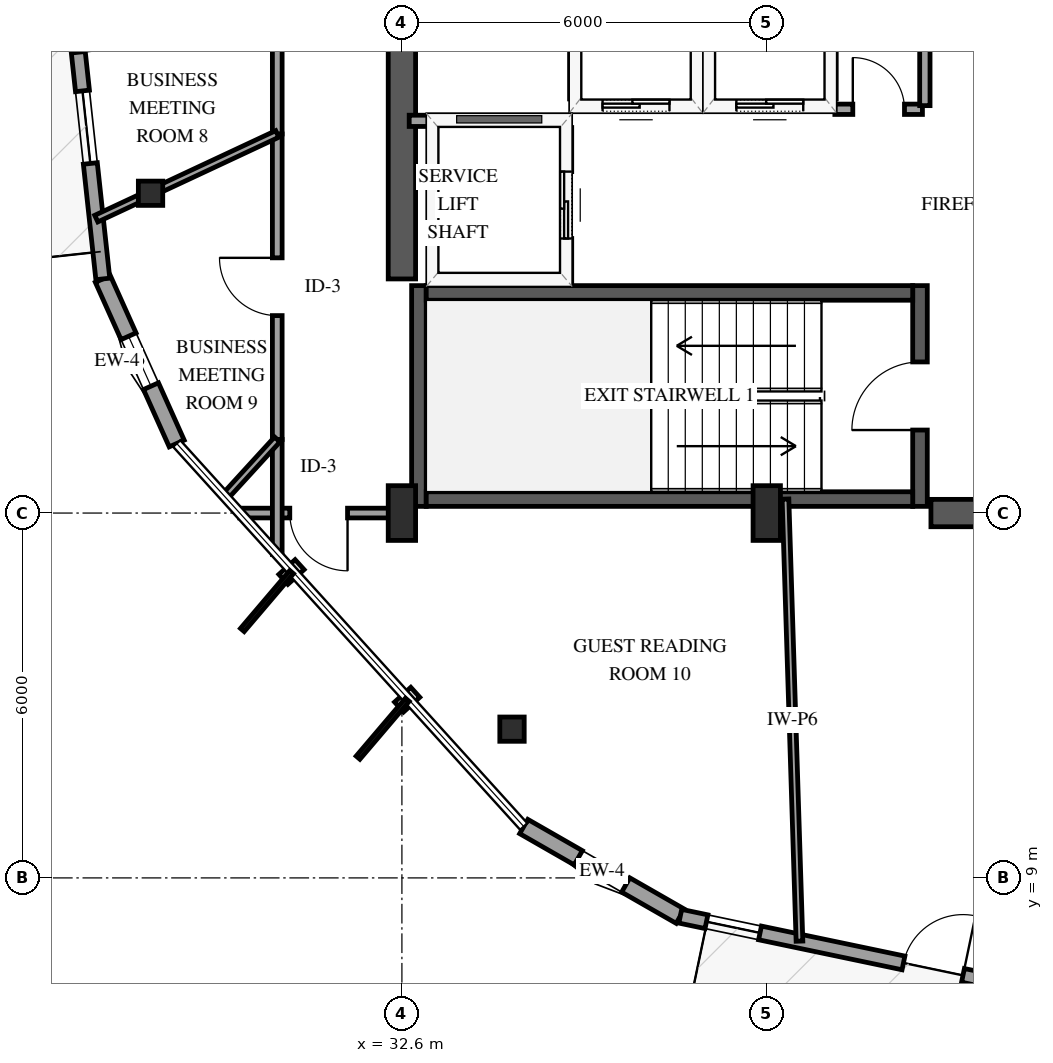
"""IFC4 building model, lengths in metres.
Left out: names, types, materials, properties, quantities, classifications, styles, units other than length and angle.
Written with IfcOpenShell. Run it as: python <this file> out.ifc"""

import sys

from ifc_helpers import new_model, si_unit, direction, frame, frame_2d, origin, origin_2d, place, context, subcontext, project, spatial, rectangle, i_section, extrude, element, fill, save


model = new_model("IFC4")
c1 = context("Model", 3, precision=1e-05, world=origin(), true_north=direction((0.0, 1.0)))
c2 = subcontext(c1, "Body", "Model", "MODEL_VIEW")
j1 = project(units=[si_unit("LENGTHUNIT", "METRE"), si_unit("PLANEANGLEUNIT", "RADIAN")], contexts=[c1])
p1 = place(None, origin())
s1 = spatial("IfcSite", under=j1, at=p1, CompositionType="ELEMENT")
p2 = place(p1, origin())
s2 = spatial("IfcBuilding", under=s1, at=p2, CompositionType="ELEMENT")
p3 = place(p2, frame((0.0, 0.0, 253.75)))
s3 = spatial("IfcBuildingStorey", under=s2, at=p3, CompositionType="ELEMENT", Elevation=253.75)
p4 = place(p3, frame((32.88, 15.11, 0.0), z_axis=(0.0, 0.0, 1.0), x_axis=(0.0, 1.0, 0.0)))
e1 = element("IfcWall", 1, at=p4, inside=s3, PredefinedType="SHEAR", context=c2, shape_type="SweptSolid", body=[
    extrude(rectangle(XDim=3.63, YDim=0.24, at=frame_2d((1.815, 0.0))), origin(), (0.0, 0.0, 1.0), 3.75),
])
p5 = place(p3, frame((41.12, 15.11, 0.0), z_axis=(0.0, 0.0, 1.0), x_axis=(0.0, 1.0, 0.0)))
e2 = element("IfcWall", 2, at=p5, inside=s3, PredefinedType="SHEAR", context=c2, shape_type="SweptSolid", body=[
    extrude(rectangle(XDim=3.63, YDim=0.24, at=frame_2d((1.815, 0.0))), origin(), (0.0, 0.0, 1.0), 3.75),
])
p6 = place(p5, frame((1.255, 0.0, 0.0)))
e3 = element("IfcOpeningElement", 3, at=p6, cuts=e2, PredefinedType="OPENING", context=c2, shape_type="SweptSolid", body=[
    extrude(rectangle(XDim=1.12, YDim=2.15, at=frame_2d((0.56, 1.075))), frame((0.0, 0.13, 0.0), z_axis=(0.0, -1.0, 0.0), x_axis=(1.0, 0.0, 0.0)), (0.0, 0.0, 1.0), 0.26),
])
for number, where, z_axis, x_axis in (
    (4, (33.0, 15.23, 0.0), (0.0, 0.0, 1.0), (1.0, 0.0, 0.0)),
    (5, (33.0, 18.62, 0.0), (0.0, 0.0, 1.0), (1.0, 0.0, 0.0)),
):
    element("IfcWall", number, at=place(p3, frame(where, z_axis=z_axis, x_axis=x_axis)), inside=s3, PredefinedType="SHEAR", context=c2, shape_type="SweptSolid", body=[
        extrude(rectangle(XDim=8.0, YDim=0.24, at=frame_2d((4.0, 0.0))), origin(), (0.0, 0.0, 1.0), 3.75),
    ])
p7 = place(p3, frame((32.6, 18.85, 0.0), z_axis=(0.0, 0.0, 1.0), x_axis=(0.0, 1.0, 0.0)))
e6 = element("IfcWall", 6, at=p7, inside=s3, PredefinedType="SHEAR", context=c2, shape_type="SweptSolid", body=[
    extrude(rectangle(XDim=12.3, YDim=0.45, at=frame_2d((6.15, 0.0))), origin(), (0.0, 0.0, 1.0), 3.75),
])
p8 = place(p3, frame((41.3, 15.0, 0.0), z_axis=(0.0, 0.0, 1.0), x_axis=(1.0, 0.0, 0.0)))
e7 = element("IfcWall", 7, at=p8, inside=s3, PredefinedType="SHEAR", context=c2, shape_type="SweptSolid", body=[
    extrude(rectangle(XDim=2.85, YDim=0.45, at=frame_2d((1.425, 0.0))), origin(), (0.0, 0.0, 1.0), 3.75),
])
for number, where, z_axis, x_axis in (
    (8, (32.6, 15.0, 0.0), (0.0, 0.0, 1.0), (1.0, 0.0, 0.0)),
    (9, (38.6, 15.0, 0.0), (0.0, 0.0, 1.0), (1.0, 0.0, 0.0)),
):
    element("IfcColumn", number, at=place(p3, frame(where, z_axis=z_axis, x_axis=x_axis)), inside=s3, PredefinedType="PILASTER", context=c2, shape_type="SweptSolid", body=[
        extrude(rectangle(XDim=0.45, YDim=0.9, at=origin_2d()), origin(), (0.0, 0.0, 1.0), 3.75),
    ])
for number, where, z_axis, x_axis in (
    (10, (28.466, 20.259, 0.0), (0.0, 0.0, 1.0), (1.0, 0.0, 0.0)),
    (11, (34.411, 11.446, 0.0), (0.0, 0.0, 1.0), (1.0, 0.0, 0.0)),
):
    element("IfcColumn", number, at=place(p3, frame(where, z_axis=z_axis, x_axis=x_axis)), inside=s3, PredefinedType="COLUMN", context=c2, shape_type="SweptSolid", body=[
        extrude(i_section(OverallWidth=0.401, OverallDepth=0.399, WebThickness=0.025, FlangeThickness=0.04, FilletRadius=0.038, at=origin_2d()), origin(), (0.0, 0.0, 1.0), 3.75),
    ])
p9 = place(p3, frame((27.682, 18.85, 0.0), z_axis=(0.0, 0.0, 1.0), x_axis=(0.40959459615, -0.912267650859, 0.0)))
e12 = element("IfcWall", 12, at=p9, inside=s3, PredefinedType="SOLIDWALL", context=c2, shape_type="SweptSolid", body=[
    extrude(rectangle(XDim=2.967, YDim=0.27, at=frame_2d((1.483, 0.0))), origin(), (0.0, 0.0, 1.0), 2.829),
])
p10 = place(p9, frame((1.033, 0.0, 0.75)))
e13 = element("IfcOpeningElement", 13, at=p10, cuts=e12, PredefinedType="OPENING", context=c2, shape_type="SweptSolid", body=[
    extrude(rectangle(XDim=0.9, YDim=1.5, at=frame_2d((0.45, 0.75))), frame((0.0, 0.145, 0.0), z_axis=(0.0, -1.0, 0.0), x_axis=(1.0, 0.0, 0.0)), (0.0, 0.0, 1.0), 0.29),
])
p11 = place(p3, frame((26.767, 27.3, 0.0), z_axis=(0.0, 0.0, 1.0), x_axis=(0.107656797247, -0.994188118017, 0.0)))
e14 = element("IfcWall", 14, at=p11, inside=s3, PredefinedType="SOLIDWALL", context=c2, shape_type="SweptSolid", body=[
    extrude(rectangle(XDim=8.5, YDim=0.23, at=frame_2d((4.25, 0.0))), origin(), (0.0, 0.0, 1.0), 2.829),
])
p12 = place(p11, frame((3.75, 0.0, 0.0)))
e15 = element("IfcOpeningElement", 15, at=p12, cuts=e14, PredefinedType="OPENING", context=c2, shape_type="SweptSolid", body=[
    extrude(rectangle(XDim=1.0, YDim=2.15, at=frame_2d((0.5, 1.075))), frame((0.0, 0.125, 0.0), z_axis=(0.0, -1.0, 0.0), x_axis=(1.0, 0.0, 0.0)), (0.0, 0.0, 1.0), 0.25),
])
p13 = place(p11, frame((0.44, 0.0, 0.72)))
e16 = element("IfcOpeningElement", 16, at=p13, cuts=e14, PredefinedType="OPENING", context=c2, shape_type="SweptSolid", body=[
    extrude(rectangle(XDim=1.2, YDim=1.6, at=frame_2d((0.6, 0.8))), frame((0.0, 0.125, 0.0), z_axis=(0.0, -1.0, 0.0), x_axis=(1.0, 0.0, 0.0)), (0.0, 0.0, 1.0), 0.25),
])
p14 = place(p11, frame((5.39, 0.0, 0.72)))
e17 = element("IfcOpeningElement", 17, at=p14, cuts=e14, PredefinedType="OPENING", context=c2, shape_type="SweptSolid", body=[
    extrude(rectangle(XDim=1.2, YDim=1.6, at=frame_2d((0.6, 0.8))), frame((0.0, 0.125, 0.0), z_axis=(0.0, -1.0, 0.0), x_axis=(1.0, 0.0, 0.0)), (0.0, 0.0, 1.0), 0.25),
])
p15 = place(p3, frame((34.604, 9.845, 0.0), z_axis=(0.0, 0.0, 1.0), x_axis=(0.867604284104, -0.497255272677, 0.0)))
e18 = element("IfcWall", 18, at=p15, inside=s3, PredefinedType="SOLIDWALL", context=c2, shape_type="SweptSolid", body=[
    extrude(rectangle(XDim=2.967, YDim=0.27, at=frame_2d((1.483, 0.0))), origin(), (0.0, 0.0, 1.0), 2.829),
])
p16 = place(p15, frame((1.033, 0.0, 0.75)))
e19 = element("IfcOpeningElement", 19, at=p16, cuts=e18, PredefinedType="OPENING", context=c2, shape_type="SweptSolid", body=[
    extrude(rectangle(XDim=0.9, YDim=1.5, at=frame_2d((0.45, 0.75))), frame((0.0, 0.145, 0.0), z_axis=(0.0, -1.0, 0.0), x_axis=(1.0, 0.0, 0.0)), (0.0, 0.0, 1.0), 0.29),
])
p17 = place(p3, frame((37.178, 8.37, 0.0), z_axis=(0.0, 0.0, 1.0), x_axis=(0.978792902195, -0.204852275096, 0.0)))
e20 = element("IfcWall", 20, at=p17, inside=s3, PredefinedType="SOLIDWALL", context=c2, shape_type="SweptSolid", body=[
    extrude(rectangle(XDim=8.5, YDim=0.23, at=frame_2d((4.25, 0.0))), origin(), (0.0, 0.0, 1.0), 2.829),
])
p18 = place(p17, frame((3.75, 0.0, 0.0)))
e21 = element("IfcOpeningElement", 21, at=p18, cuts=e20, PredefinedType="OPENING", context=c2, shape_type="SweptSolid", body=[
    extrude(rectangle(XDim=1.0, YDim=2.15, at=frame_2d((0.5, 1.075))), frame((0.0, 0.125, 0.0), z_axis=(0.0, -1.0, 0.0), x_axis=(1.0, 0.0, 0.0)), (0.0, 0.0, 1.0), 0.25),
])
p19 = place(p17, frame((0.44, 0.0, 0.72)))
e22 = element("IfcOpeningElement", 22, at=p19, cuts=e20, PredefinedType="OPENING", context=c2, shape_type="SweptSolid", body=[
    extrude(rectangle(XDim=0.9, YDim=1.5, at=frame_2d((0.45, 0.75))), frame((0.0, 0.125, 0.0), z_axis=(0.0, -1.0, 0.0), x_axis=(1.0, 0.0, 0.0)), (0.0, 0.0, 1.0), 0.25),
])
p20 = place(p17, frame((5.39, 0.0, 0.72)))
e23 = element("IfcOpeningElement", 23, at=p20, cuts=e20, PredefinedType="OPENING", context=c2, shape_type="SweptSolid", body=[
    extrude(rectangle(XDim=1.2, YDim=1.6, at=frame_2d((0.6, 0.8))), frame((0.0, 0.125, 0.0), z_axis=(0.0, -1.0, 0.0), x_axis=(1.0, 0.0, 0.0)), (0.0, 0.0, 1.0), 0.25),
])
p21 = place(p3, frame((35.45, 21.7, 0.0), z_axis=(0.0, 0.0, 1.0), x_axis=(1.0, 0.0, 0.0)))
e24 = element("IfcWall", 24, at=p21, inside=s3, PredefinedType="SOLIDWALL", context=c2, shape_type="SweptSolid", body=[
    extrude(rectangle(XDim=2.0, YDim=0.185, at=frame_2d((1.0, 0.0))), origin(), (0.0, 0.0, 1.0), 2.824),
])
p22 = place(p21, frame((0.45, 0.0, 0.0)))
e25 = element("IfcOpeningElement", 25, at=p22, cuts=e24, PredefinedType="OPENING", context=c2, shape_type="SweptSolid", body=[
    extrude(rectangle(XDim=1.1, YDim=2.15, at=frame_2d((0.55, 1.075))), frame((0.0, 0.103, 0.0), z_axis=(0.0, -1.0, 0.0), x_axis=(1.0, 0.0, 0.0)), (0.0, 0.0, 1.0), 0.205),
])
for number, where, z_axis, x_axis in (
    (26, (35.45, 21.81, 0.0), (0.0, 0.0, 1.0), (0.0, 1.0, 0.0)),
    (27, (37.45, 21.81, 0.0), (0.0, 0.0, 1.0), (0.0, 1.0, 0.0)),
):
    element("IfcWall", number, at=place(p3, frame(where, z_axis=z_axis, x_axis=x_axis)), inside=s3, PredefinedType="SOLIDWALL", context=c2, shape_type="SweptSolid", body=[
        extrude(rectangle(XDim=2.38, YDim=0.185, at=frame_2d((1.19, 0.0))), origin(), (0.0, 0.0, 1.0), 3.45),
    ])
p23 = place(p3, frame((37.65, 21.7, 0.0), z_axis=(0.0, 0.0, 1.0), x_axis=(1.0, 0.0, 0.0)))
e28 = element("IfcWall", 28, at=p23, inside=s3, PredefinedType="SOLIDWALL", context=c2, shape_type="SweptSolid", body=[
    extrude(rectangle(XDim=2.0, YDim=0.185, at=frame_2d((1.0, 0.0))), origin(), (0.0, 0.0, 1.0), 2.824),
])
p24 = place(p23, frame((0.45, 0.0, 0.0)))
e29 = element("IfcOpeningElement", 29, at=p24, cuts=e28, PredefinedType="OPENING", context=c2, shape_type="SweptSolid", body=[
    extrude(rectangle(XDim=1.1, YDim=2.15, at=frame_2d((0.55, 1.075))), frame((0.0, 0.103, 0.0), z_axis=(0.0, -1.0, 0.0), x_axis=(1.0, 0.0, 0.0)), (0.0, 0.0, 1.0), 0.205),
])
p25 = place(p3, frame((39.65, 21.81, 0.0), z_axis=(0.0, 0.0, 1.0), x_axis=(0.0, 1.0, 0.0)))
e30 = element("IfcWall", 30, at=p25, inside=s3, PredefinedType="SOLIDWALL", context=c2, shape_type="SweptSolid", body=[
    extrude(rectangle(XDim=2.38, YDim=0.185, at=frame_2d((1.19, 0.0))), origin(), (0.0, 0.0, 1.0), 3.45),
])
p26 = place(p3, frame((32.72, 21.45, 0.0), z_axis=(0.0, 0.0, 1.0), x_axis=(1.0, 0.0, 0.0)))
e31 = element("IfcWall", 31, at=p26, inside=s3, PredefinedType="SOLIDWALL", context=c2, shape_type="SweptSolid", body=[
    extrude(rectangle(XDim=2.58, YDim=0.185, at=frame_2d((1.29, 0.0))), origin(), (0.0, 0.0, 1.0), 2.824),
])
p27 = place(p3, frame((35.3, 18.79, 0.0), z_axis=(0.0, 0.0, 1.0), x_axis=(0.0, 1.0, 0.0)))
e32 = element("IfcWall", 32, at=p27, inside=s3, PredefinedType="SOLIDWALL", context=c2, shape_type="SweptSolid", body=[
    extrude(rectangle(XDim=2.55, YDim=0.185, at=frame_2d((1.275, 0.0))), origin(), (0.0, 0.0, 1.0), 3.45),
])
p28 = place(p27, frame((0.725, 0.0, 0.0)))
e33 = element("IfcOpeningElement", 33, at=p28, cuts=e32, PredefinedType="OPENING", context=c2, shape_type="SweptSolid", body=[
    extrude(rectangle(XDim=1.1, YDim=2.15, at=frame_2d((0.55, 1.075))), frame((0.0, 0.103, 0.0), z_axis=(0.0, -1.0, 0.0), x_axis=(1.0, 0.0, 0.0)), (0.0, 0.0, 1.0), 0.205),
])
p29 = place(p3, frame((38.908, 15.23, 0.0), z_axis=(0.0, 0.0, 1.0), x_axis=(0.031618275785, -0.999500017327, 0.0)))
e34 = element("IfcWall", 34, at=p29, inside=s3, PredefinedType="PARTITIONING", context=c2, shape_type="SweptSolid", body=[
    extrude(rectangle(XDim=7.274, YDim=0.11, at=frame_2d((3.637, 0.0))), origin(), (0.0, 0.0, 1.0), 3.45),
])
p30 = place(p3, frame((30.55, 16.21, 0.0), z_axis=(0.0, 0.0, 1.0), x_axis=(0.0, 1.0, 0.0)))
e35 = element("IfcWall", 35, at=p30, inside=s3, PredefinedType="PARTITIONING", context=c2, shape_type="SweptSolid", body=[
    extrude(rectangle(XDim=5.024, YDim=0.16, at=frame_2d((2.512, 0.0))), origin(), (0.0, 0.0, 1.0), 3.45),
])
p31 = place(p30, frame((2.037, 0.0, 0.0)))
e36 = element("IfcOpeningElement", 36, at=p31, cuts=e35, PredefinedType="OPENING", context=c2, shape_type="SweptSolid", body=[
    extrude(rectangle(XDim=0.95, YDim=2.15, at=frame_2d((0.475, 1.075))), frame((0.0, 0.09, 0.0), z_axis=(0.0, -1.0, 0.0), x_axis=(1.0, 0.0, 0.0)), (0.0, 0.0, 1.0), 0.18),
])
p32 = place(p3, frame((30.55, 21.234, 0.0), z_axis=(0.0, 0.0, 1.0), x_axis=(0.0, 1.0, 0.0)))
e37 = element("IfcWall", 37, at=p32, inside=s3, PredefinedType="PARTITIONING", context=c2, shape_type="SweptSolid", body=[
    extrude(rectangle(XDim=3.951, YDim=0.16, at=frame_2d((1.976, 0.0))), origin(), (0.0, 0.0, 1.0), 3.45),
])
p33 = place(p32, frame((1.5, 0.0, 0.0)))
e38 = element("IfcOpeningElement", 38, at=p33, cuts=e37, PredefinedType="OPENING", context=c2, shape_type="SweptSolid", body=[
    extrude(rectangle(XDim=0.95, YDim=2.15, at=frame_2d((0.475, 1.075))), frame((0.0, 0.09, 0.0), z_axis=(0.0, -1.0, 0.0), x_axis=(1.0, 0.0, 0.0)), (0.0, 0.0, 1.0), 0.18),
])
p34 = place(p3, frame((30.55, 21.234, 0.0), z_axis=(0.0, 0.0, 1.0), x_axis=(-0.905831620634, -0.423637905598, 0.0)))
e39 = element("IfcWall", 39, at=p34, inside=s3, PredefinedType="PARTITIONING", context=c2, shape_type="SweptSolid", body=[
    extrude(rectangle(XDim=3.285, YDim=0.12, at=frame_2d((1.643, 0.0))), origin(), (0.0, 0.0, 1.0), 3.45),
])
p35 = place(p3, frame((32.53, 15.0, 0.0), z_axis=(0.0, 0.0, 1.0), x_axis=(-1.0, 0.0, 0.0)))
e40 = element("IfcWall", 40, at=p35, inside=s3, PredefinedType="PARTITIONING", context=c2, shape_type="SweptSolid", body=[
    extrude(rectangle(XDim=2.597, YDim=0.16, at=frame_2d((1.298, 0.0))), origin(), (0.0, 0.0, 1.0), 3.45),
])
p36 = place(p35, frame((0.824, 0.0, 0.0)))
e41 = element("IfcOpeningElement", 41, at=p36, cuts=e40, PredefinedType="OPENING", context=c2, shape_type="SweptSolid", body=[
    extrude(rectangle(XDim=0.95, YDim=2.15, at=frame_2d((0.475, 1.075))), frame((0.0, 0.09, 0.0), z_axis=(0.0, -1.0, 0.0), x_axis=(1.0, 0.0, 0.0)), (0.0, 0.0, 1.0), 0.18),
])
p37 = place(p3, frame((30.55, 14.319, 0.0), z_axis=(0.0, 0.0, 1.0), x_axis=(0.0, 1.0, 0.0)))
e42 = element("IfcWall", 42, at=p37, inside=s3, PredefinedType="PARTITIONING", context=c2, shape_type="SweptSolid", body=[
    extrude(rectangle(XDim=1.891, YDim=0.16, at=frame_2d((0.945, 0.0))), origin(), (0.0, 0.0, 1.0), 3.45),
])
p38 = place(p3, frame((39.72, 21.64, 0.0), z_axis=(0.0, 0.0, 1.0), x_axis=(1.0, 0.0, 0.0)))
e43 = element("IfcWall", 43, at=p38, inside=s3, PredefinedType="PARTITIONING", context=c2, shape_type="SweptSolid", body=[
    extrude(rectangle(XDim=1.44, YDim=0.17, at=frame_2d((0.72, 0.0))), origin(), (0.0, 0.0, 1.0), 2.824),
])
p39 = place(p38, frame((0.295, 0.0, 0.0)))
e44 = element("IfcOpeningElement", 44, at=p39, cuts=e43, PredefinedType="OPENING", context=c2, shape_type="SweptSolid", body=[
    extrude(rectangle(XDim=0.85, YDim=2.1, at=frame_2d((0.425, 1.05))), frame((0.0, 0.095, 0.0), z_axis=(0.0, -1.0, 0.0), x_axis=(1.0, 0.0, 0.0)), (0.0, 0.0, 1.0), 0.19),
])
p40 = place(p3, frame((30.55, 16.21, 0.0), z_axis=(0.0, 0.0, 1.0), x_axis=(-0.67511765293, -0.737710074963, 0.0)))
e45 = element("IfcWall", 45, at=p40, inside=s3, PredefinedType="PARTITIONING", context=c2, shape_type="SweptSolid", body=[
    extrude(rectangle(XDim=1.275, YDim=0.12, at=frame_2d((0.638, 0.0))), origin(), (0.0, 0.0, 1.0), 3.45),
])
p41 = place(p3, frame((41.2, 21.7, 0.0), z_axis=(0.0, 0.0, 1.0), x_axis=(0.0, 1.0, 0.0)))
e46 = element("IfcWall", 46, at=p41, inside=s3, PredefinedType="PARTITIONING", context=c2, shape_type="SweptSolid", body=[
    extrude(rectangle(XDim=1.12, YDim=0.17, at=frame_2d((0.56, 0.0))), origin(), (0.0, 0.0, 1.0), 3.45),
])
p42 = place(p10, origin())
e47 = element("IfcWindow", 47, at=p42, inside=s3, PartitioningType="SINGLE_PANEL", PredefinedType="WINDOW", context=c2, shape_type="SweptSolid", body=[
    extrude(rectangle(XDim=0.9, YDim=1.5, at=frame_2d((0.45, 0.75))), frame((0.0, 0.03, 0.0), z_axis=(0.0, -1.0, 0.0), x_axis=(1.0, 0.0, 0.0)), (0.0, 0.0, 1.0), 0.06),
])
fill(e13, e47)
p43 = place(p12, origin())
e48 = element("IfcDoor", 48, at=p43, inside=s3, OperationType="SINGLE_SWING_RIGHT", PredefinedType="DOOR", context=c2, shape_type="SweptSolid", body=[
    extrude(rectangle(XDim=1.0, YDim=2.15, at=frame_2d((0.5, 1.075))), frame((0.0, 0.025, 0.0), z_axis=(0.0, -1.0, 0.0), x_axis=(1.0, 0.0, 0.0)), (0.0, 0.0, 1.0), 0.05),
])
fill(e15, e48)
p44 = place(p14, origin())
e49 = element("IfcWindow", 49, at=p44, inside=s3, PartitioningType="SINGLE_PANEL", PredefinedType="WINDOW", context=c2, shape_type="SweptSolid", body=[
    extrude(rectangle(XDim=1.2, YDim=1.6, at=frame_2d((0.6, 0.8))), frame((0.0, 0.03, 0.0), z_axis=(0.0, -1.0, 0.0), x_axis=(1.0, 0.0, 0.0)), (0.0, 0.0, 1.0), 0.06),
])
fill(e17, e49)
p45 = place(p16, origin())
e50 = element("IfcWindow", 50, at=p45, inside=s3, PartitioningType="SINGLE_PANEL", PredefinedType="WINDOW", context=c2, shape_type="SweptSolid", body=[
    extrude(rectangle(XDim=0.9, YDim=1.5, at=frame_2d((0.45, 0.75))), frame((0.0, 0.03, 0.0), z_axis=(0.0, -1.0, 0.0), x_axis=(1.0, 0.0, 0.0)), (0.0, 0.0, 1.0), 0.06),
])
fill(e19, e50)
p46 = place(p18, origin())
e51 = element("IfcDoor", 51, at=p46, inside=s3, OperationType="SINGLE_SWING_RIGHT", PredefinedType="DOOR", context=c2, shape_type="SweptSolid", body=[
    extrude(rectangle(XDim=1.0, YDim=2.15, at=frame_2d((0.5, 1.075))), frame((0.0, 0.025, 0.0), z_axis=(0.0, -1.0, 0.0), x_axis=(1.0, 0.0, 0.0)), (0.0, 0.0, 1.0), 0.05),
])
fill(e21, e51)
p47 = place(p19, origin())
e52 = element("IfcWindow", 52, at=p47, inside=s3, PartitioningType="SINGLE_PANEL", PredefinedType="WINDOW", context=c2, shape_type="SweptSolid", body=[
    extrude(rectangle(XDim=0.9, YDim=1.5, at=frame_2d((0.45, 0.75))), frame((0.0, 0.03, 0.0), z_axis=(0.0, -1.0, 0.0), x_axis=(1.0, 0.0, 0.0)), (0.0, 0.0, 1.0), 0.06),
])
fill(e22, e52)
p48 = place(p22, origin())
e53 = element("IfcDoor", 53, at=p48, inside=s3, OperationType="SLIDING_TO_LEFT", PredefinedType="DOOR", context=c2, shape_type="SweptSolid", body=[
    extrude(rectangle(XDim=1.1, YDim=2.15, at=frame_2d((0.55, 1.075))), frame((0.0, 0.025, 0.0), z_axis=(0.0, -1.0, 0.0), x_axis=(1.0, 0.0, 0.0)), (0.0, 0.0, 1.0), 0.05),
])
fill(e25, e53)
p49 = place(p24, origin())
e54 = element("IfcDoor", 54, at=p49, inside=s3, OperationType="SLIDING_TO_LEFT", PredefinedType="DOOR", context=c2, shape_type="SweptSolid", body=[
    extrude(rectangle(XDim=1.1, YDim=2.15, at=frame_2d((0.55, 1.075))), frame((0.0, 0.025, 0.0), z_axis=(0.0, -1.0, 0.0), x_axis=(1.0, 0.0, 0.0)), (0.0, 0.0, 1.0), 0.05),
])
fill(e29, e54)
p50 = place(p28, origin())
e55 = element("IfcDoor", 55, at=p50, inside=s3, OperationType="SLIDING_TO_LEFT", PredefinedType="DOOR", context=c2, shape_type="SweptSolid", body=[
    extrude(rectangle(XDim=1.1, YDim=2.15, at=frame_2d((0.55, 1.075))), frame((0.0, 0.025, 0.0), z_axis=(0.0, -1.0, 0.0), x_axis=(1.0, 0.0, 0.0)), (0.0, 0.0, 1.0), 0.05),
])
fill(e33, e55)
p51 = place(p6, origin())
e56 = element("IfcDoor", 56, at=p51, inside=s3, OperationType="SINGLE_SWING_LEFT", PredefinedType="DOOR", context=c2, shape_type="SweptSolid", body=[
    extrude(rectangle(XDim=1.12, YDim=2.15, at=frame_2d((0.56, 1.075))), frame((0.0, 0.025, 0.0), z_axis=(0.0, -1.0, 0.0), x_axis=(1.0, 0.0, 0.0)), (0.0, 0.0, 1.0), 0.05),
])
fill(e3, e56)
p52 = place(p31, origin())
e57 = element("IfcDoor", 57, at=p52, inside=s3, OperationType="SINGLE_SWING_RIGHT", PredefinedType="DOOR", context=c2, shape_type="SweptSolid", body=[
    extrude(rectangle(XDim=0.95, YDim=2.15, at=frame_2d((0.475, 1.075))), frame((0.0, 0.025, 0.0), z_axis=(0.0, -1.0, 0.0), x_axis=(1.0, 0.0, 0.0)), (0.0, 0.0, 1.0), 0.05),
])
fill(e36, e57)
p53 = place(p36, origin())
e58 = element("IfcDoor", 58, at=p53, inside=s3, OperationType="SINGLE_SWING_LEFT", PredefinedType="DOOR", context=c2, shape_type="SweptSolid", body=[
    extrude(rectangle(XDim=0.95, YDim=2.15, at=frame_2d((0.475, 1.075))), frame((0.0, 0.025, 0.0), z_axis=(0.0, -1.0, 0.0), x_axis=(1.0, 0.0, 0.0)), (0.0, 0.0, 1.0), 0.05),
])
fill(e41, e58)
p54 = place(p39, origin())
e59 = element("IfcDoor", 59, at=p54, inside=s3, OperationType="SINGLE_SWING_LEFT", PredefinedType="DOOR", context=c2, shape_type="SweptSolid", body=[
    extrude(rectangle(XDim=0.85, YDim=2.1, at=frame_2d((0.425, 1.05))), frame((0.0, 0.025, 0.0), z_axis=(0.0, -1.0, 0.0), x_axis=(1.0, 0.0, 0.0)), (0.0, 0.0, 1.0), 0.05),
])
fill(e44, e59)
save(model, sys.argv[1])
